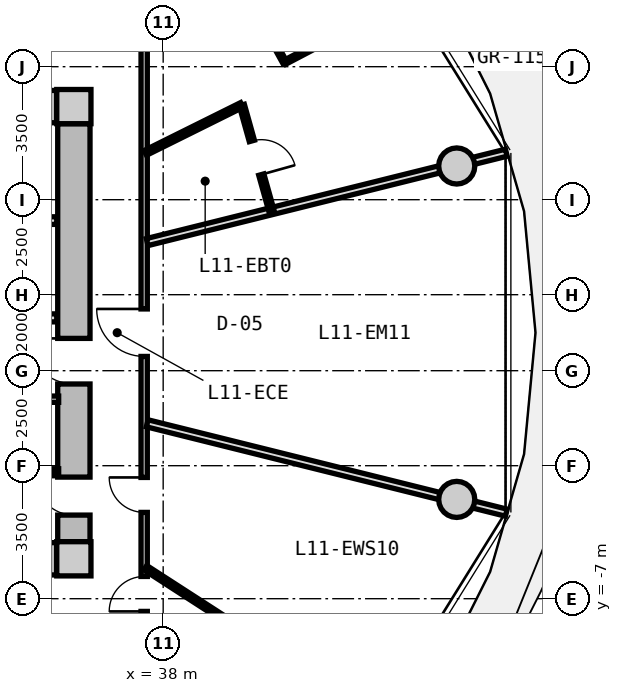
"""IFC4 building model, lengths in metres.
Left out: names, types, materials, properties, quantities, classifications, styles, units other than length and angle.
Written with IfcOpenShell. Run it as: python <this file> out.ifc"""

import sys

from ifc_helpers import new_model, si_unit, direction, frame, frame_2d, origin, origin_2d, place, context, subcontext, project, spatial, rectangle, circle, extrude, source, transform, mapped, element, fill, save


model = new_model("IFC4")
c1 = context("Model", 3, precision=1e-05, world=origin(), true_north=direction((0.0, 1.0)))
c2 = subcontext(c1, "Body", "Model", "MODEL_VIEW")
j1 = project(units=[si_unit("LENGTHUNIT", "METRE"), si_unit("PLANEANGLEUNIT", "RADIAN")], contexts=[c1])
p1 = place(None, origin())
s1 = spatial("IfcSite", under=j1, at=p1, CompositionType="ELEMENT")
p2 = place(p1, origin())
s2 = spatial("IfcBuilding", under=s1, at=p2, CompositionType="ELEMENT")
p3 = place(p2, frame((0.0, 0.0, 39.9)))
s3 = spatial("IfcBuildingStorey", under=s2, at=p3, CompositionType="ELEMENT", Elevation=39.9)
m1 = source(origin(), c2, "Body", "SweptSolid", [
    extrude(rectangle(XDim=0.9, YDim=0.9, at=origin_2d()), origin(), (0.0, 0.0, 1.0), 3.05),
])
for number, where, z_axis, x_axis in (
    (1, (35.65, -5.95, 0.0), (0.0, 0.0, 1.0), (1.0, 0.0, 0.0)),
    (2, (35.65, 5.95, 0.0), (0.0, 0.0, 1.0), (1.0, 0.0, 0.0)),
):
    element("IfcColumn", number, at=place(p3, frame(where, z_axis=z_axis, x_axis=x_axis)), inside=s3, PredefinedType="COLUMN", context=c2, shape_type="MappedRepresentation", body=[
        mapped(m1, transform((0.0, 0.0, 0.0), x_axis=(1.0, 0.0, 0.0), y_axis=(0.0, 1.0, 0.0), z_axis=(0.0, 0.0, 1.0), scale=1.0)),
    ])
m2 = source(origin(), c2, "Body", "SweptSolid", [
    extrude(rectangle(XDim=14.4, YDim=0.85, at=frame_2d((7.2, 0.0))), origin(), (0.0, 0.0, 1.0), 2.79),
])
for number, where, z_axis, x_axis in (
    (3, (20.8, 5.95, 0.0), (0.0, 0.0, 1.0), (1.0, 0.0, 0.0)),
    (4, (35.2, -5.95, 0.0), (0.0, 0.0, 1.0), (-1.0, 0.0, 0.0)),
):
    element("IfcWall", number, at=place(p3, frame(where, z_axis=z_axis, x_axis=x_axis)), inside=s3, PredefinedType="SHEAR", context=c2, shape_type="MappedRepresentation", body=[
        mapped(m2, transform((0.0, 0.0, 0.0), x_axis=(1.0, 0.0, 0.0), y_axis=(0.0, 1.0, 0.0), z_axis=(0.0, 0.0, 1.0), scale=1.0)),
    ])
m3 = source(origin(), c2, "Body", "SweptSolid", [
    extrude(rectangle(XDim=11.0, YDim=0.85, at=frame_2d((5.5, 0.0))), origin(), (0.0, 0.0, 1.0), 2.79),
])
p4 = place(p3, frame((35.65, 5.5, 0.0), z_axis=(0.0, 0.0, 1.0), x_axis=(0.0, -1.0, 0.0)))
e5 = element("IfcWall", 5, at=p4, inside=s3, PredefinedType="SHEAR", context=c2, shape_type="MappedRepresentation", body=[
    mapped(m3, transform((0.0, 0.0, 0.0), x_axis=(1.0, 0.0, 0.0), y_axis=(0.0, 1.0, 0.0), z_axis=(0.0, 0.0, 1.0), scale=1.0)),
])
p5 = place(p4, frame((5.65, 0.0, 0.0)))
e6 = element("IfcOpeningElement", 6, at=p5, cuts=e5, PredefinedType="OPENING", context=c2, shape_type="SweptSolid", body=[
    extrude(rectangle(XDim=1.2, YDim=2.15, at=frame_2d((0.6, 1.075))), frame((0.0, 0.435, 0.0), z_axis=(0.0, -1.0, 0.0), x_axis=(1.0, 0.0, 0.0)), (0.0, 0.0, 1.0), 0.87),
])
p6 = place(p4, frame((9.3, 0.0, 0.0)))
e7 = element("IfcOpeningElement", 7, at=p6, cuts=e5, PredefinedType="OPENING", context=c2, shape_type="SweptSolid", body=[
    extrude(rectangle(XDim=1.0, YDim=2.1, at=frame_2d((0.5, 1.05))), frame((0.0, 0.435, 0.0), z_axis=(0.0, -1.0, 0.0), x_axis=(1.0, 0.0, 0.0)), (0.0, 0.0, 1.0), 0.87),
])
m4 = source(origin(), c2, "Body", "SweptSolid", [
    extrude(circle(Radius=0.475, at=origin_2d()), origin(), (0.0, 0.0, 1.0), 3.05),
])
for number, where, z_axis, x_axis in (
    (8, (45.725, 4.387, 0.0), (0.0, 0.0, 1.0), (1.0, 0.0, 0.0)),
    (9, (45.725, -4.387, 0.0), (0.0, 0.0, 1.0), (1.0, 0.0, 0.0)),
):
    element("IfcColumn", number, at=place(p3, frame(where, z_axis=z_axis, x_axis=x_axis)), inside=s3, PredefinedType="COLUMN", context=c2, shape_type="MappedRepresentation", body=[
        mapped(m4, transform((0.0, 0.0, 0.0), x_axis=(1.0, 0.0, 0.0), y_axis=(0.0, 1.0, 0.0), z_axis=(0.0, 0.0, 1.0), scale=1.0)),
    ])
m5 = source(origin(), c2, "Body", "SweptSolid", [
    extrude(rectangle(XDim=3.2, YDim=0.2, at=frame_2d((1.6, 0.0))), origin(), (0.0, 0.0, 1.0), 2.775),
])
p7 = place(p3, frame((32.0, 2.95, 0.0), z_axis=(0.0, 0.0, 1.0), x_axis=(1.0, 0.0, 0.0)))
e10 = element("IfcWall", 10, at=p7, inside=s3, PredefinedType="PARTITIONING", context=c2, shape_type="MappedRepresentation", body=[
    mapped(m5, transform((0.0, 0.0, 0.0), x_axis=(1.0, 0.0, 0.0), y_axis=(0.0, 1.0, 0.0), z_axis=(0.0, 0.0, 1.0), scale=1.0)),
])
m6 = source(origin(), c2, "Body", "SweptSolid", [
    extrude(rectangle(XDim=6.66, YDim=0.21, at=frame_2d((3.33, 0.0))), origin(), (0.0, 0.0, 1.0), 2.775),
])
p8 = place(p3, frame((28.54, 0.39, 0.0), z_axis=(0.0, 0.0, 1.0), x_axis=(1.0, 0.0, 0.0)))
e11 = element("IfcWall", 11, at=p8, inside=s3, PredefinedType="PARTITIONING", context=c2, shape_type="MappedRepresentation", body=[
    mapped(m6, transform((0.0, 0.0, 0.0), x_axis=(1.0, 0.0, 0.0), y_axis=(0.0, 1.0, 0.0), z_axis=(0.0, 0.0, 1.0), scale=1.0)),
])
p9 = place(p8, frame((1.0, 0.0, 0.0)))
e12 = element("IfcOpeningElement", 12, at=p9, cuts=e11, PredefinedType="OPENING", context=c2, shape_type="SweptSolid", body=[
    extrude(rectangle(XDim=1.2, YDim=2.15, at=frame_2d((0.6, 1.075))), frame((0.0, 0.115, 0.0), z_axis=(0.0, -1.0, 0.0), x_axis=(1.0, 0.0, 0.0)), (0.0, 0.0, 1.0), 0.23),
])
m7 = source(origin(), c2, "Body", "SweptSolid", [
    extrude(rectangle(XDim=2.7, YDim=0.165, at=frame_2d((1.35, 0.0))), origin(), (0.0, 0.0, 1.0), 2.775),
])
p10 = place(p3, frame((32.55, -1.75, 0.0), z_axis=(0.0, 0.0, 1.0), x_axis=(1.0, 0.0, 0.0)))
e13 = element("IfcWall", 13, at=p10, inside=s3, PredefinedType="PARTITIONING", context=c2, shape_type="MappedRepresentation", body=[
    mapped(m7, transform((0.0, 0.0, 0.0), x_axis=(1.0, 0.0, 0.0), y_axis=(0.0, 1.0, 0.0), z_axis=(0.0, 0.0, 1.0), scale=1.0)),
])
p11 = place(p10, frame((0.85, 0.0, 0.0)))
e14 = element("IfcOpeningElement", 14, at=p11, cuts=e13, PredefinedType="OPENING", context=c2, shape_type="SweptSolid", body=[
    extrude(rectangle(XDim=0.925, YDim=2.1, at=frame_2d((0.462, 1.05))), frame((0.0, 0.093, 0.0), z_axis=(0.0, -1.0, 0.0), x_axis=(1.0, 0.0, 0.0)), (0.0, 0.0, 1.0), 0.185),
])
m8 = source(origin(), c2, "Body", "SweptSolid", [
    extrude(rectangle(XDim=2.7, YDim=0.14, at=frame_2d((1.35, 0.0))), origin(), (0.0, 0.0, 1.0), 2.775),
])
p12 = place(p3, frame((32.55, -3.65, 0.0), z_axis=(0.0, 0.0, 1.0), x_axis=(1.0, 0.0, 0.0)))
e15 = element("IfcWall", 15, at=p12, inside=s3, PredefinedType="PARTITIONING", context=c2, shape_type="MappedRepresentation", body=[
    mapped(m8, transform((0.0, 0.0, 0.0), x_axis=(1.0, 0.0, 0.0), y_axis=(0.0, 1.0, 0.0), z_axis=(0.0, 0.0, 1.0), scale=1.0)),
])
m9 = source(origin(), c2, "Body", "SweptSolid", [
    extrude(rectangle(XDim=15.6, YDim=0.165, at=frame_2d((7.8, 0.0))), origin(), (0.0, 0.0, 1.0), 2.775),
])
p13 = place(p3, frame((37.5, 7.8, 0.0), z_axis=(0.0, 0.0, 1.0), x_axis=(0.0, -1.0, 0.0)))
e16 = element("IfcWall", 16, at=p13, inside=s3, PredefinedType="PARTITIONING", context=c2, shape_type="MappedRepresentation", body=[
    mapped(m9, transform((0.0, 0.0, 0.0), x_axis=(1.0, 0.0, 0.0), y_axis=(0.0, 1.0, 0.0), z_axis=(0.0, 0.0, 1.0), scale=1.0)),
])
p14 = place(p13, frame((14.215, 0.0, 0.0)))
e17 = element("IfcOpeningElement", 17, at=p14, cuts=e16, PredefinedType="OPENING", context=c2, shape_type="SweptSolid", body=[
    extrude(rectangle(XDim=0.92, YDim=2.1, at=frame_2d((0.46, 1.05))), frame((0.0, 0.093, 0.0), z_axis=(0.0, -1.0, 0.0), x_axis=(1.0, 0.0, 0.0)), (0.0, 0.0, 1.0), 0.185),
])
p15 = place(p13, frame((11.609, 0.0, 0.0)))
e18 = element("IfcOpeningElement", 18, at=p15, cuts=e16, PredefinedType="OPENING", context=c2, shape_type="SweptSolid", body=[
    extrude(rectangle(XDim=0.92, YDim=2.1, at=frame_2d((0.46, 1.05))), frame((0.0, 0.093, 0.0), z_axis=(0.0, -1.0, 0.0), x_axis=(1.0, 0.0, 0.0)), (0.0, 0.0, 1.0), 0.185),
])
p16 = place(p13, frame((7.175, 0.0, 0.0)))
e19 = element("IfcOpeningElement", 19, at=p16, cuts=e16, PredefinedType="OPENING", context=c2, shape_type="SweptSolid", body=[
    extrude(rectangle(XDim=1.25, YDim=2.2, at=frame_2d((0.625, 1.1))), frame((0.0, 0.093, 0.0), z_axis=(0.0, -1.0, 0.0), x_axis=(1.0, 0.0, 0.0)), (0.0, 0.0, 1.0), 0.185),
])
m10 = source(origin(), c2, "Body", "SweptSolid", [
    extrude(rectangle(XDim=9.737, YDim=0.19, at=frame_2d((4.869, 0.0))), origin(), (0.0, 0.0, 1.0), 2.225),
])
p17 = place(p3, frame((37.58, -2.385, 0.0), z_axis=(0.0, 0.0, 1.0), x_axis=(0.970392716238, -0.241532557375, 0.0)))
e20 = element("IfcWall", 20, at=p17, inside=s3, PredefinedType="PARTITIONING", context=c2, shape_type="MappedRepresentation", body=[
    mapped(m10, transform((0.0, 0.0, 0.0), x_axis=(1.0, 0.0, 0.0), y_axis=(0.0, 1.0, 0.0), z_axis=(0.0, 0.0, 1.0), scale=1.0)),
])
m11 = source(origin(), c2, "Body", "SweptSolid", [
    extrude(rectangle(XDim=7.304, YDim=0.14, at=frame_2d((3.652, 0.0))), origin(), (0.0, 0.0, 1.0), 2.775),
])
p18 = place(p3, frame((37.53, -6.185, 0.0), z_axis=(0.0, 0.0, 1.0), x_axis=(0.83973870965, -0.54299069929, 0.0)))
e21 = element("IfcWall", 21, at=p18, inside=s3, PredefinedType="PARTITIONING", context=c2, shape_type="MappedRepresentation", body=[
    mapped(m11, transform((0.0, 0.0, 0.0), x_axis=(1.0, 0.0, 0.0), y_axis=(0.0, 1.0, 0.0), z_axis=(0.0, 0.0, 1.0), scale=1.0)),
])
p19 = place(p3, frame((37.58, 2.385, 0.0), z_axis=(0.0, 0.0, 1.0), x_axis=(0.970392716238, 0.241532557375, 0.0)))
e22 = element("IfcWall", 22, at=p19, inside=s3, PredefinedType="PARTITIONING", context=c2, shape_type="MappedRepresentation", body=[
    mapped(m10, transform((0.0, 0.0, 0.0), x_axis=(1.0, 0.0, 0.0), y_axis=(0.0, 1.0, 0.0), z_axis=(0.0, 0.0, 1.0), scale=1.0)),
])
m12 = source(origin(), c2, "Body", "SweptSolid", [
    extrude(rectangle(XDim=2.834, YDim=0.14, at=frame_2d((1.417, 0.0))), origin(), (0.0, 0.0, 1.0), 2.775),
])
p20 = place(p3, frame((37.53, 4.732, 0.0), z_axis=(0.0, 0.0, 1.0), x_axis=(0.895681174462, 0.444696788513, 0.0)))
e23 = element("IfcWall", 23, at=p20, inside=s3, PredefinedType="PARTITIONING", context=c2, shape_type="MappedRepresentation", body=[
    mapped(m12, transform((0.0, 0.0, 0.0), x_axis=(1.0, 0.0, 0.0), y_axis=(0.0, 1.0, 0.0), z_axis=(0.0, 0.0, 1.0), scale=1.0)),
])
m13 = source(origin(), c2, "Body", "SweptSolid", [
    extrude(rectangle(XDim=2.885, YDim=0.14, at=frame_2d((1.442, 0.0))), origin(), (0.0, 0.0, 1.0), 2.775),
])
p21 = place(p3, frame((40.069, 5.992, 0.0), z_axis=(0.0, 0.0, 1.0), x_axis=(0.269799431837, -0.962916541856, 0.0)))
e24 = element("IfcWall", 24, at=p21, inside=s3, PredefinedType="PARTITIONING", context=c2, shape_type="MappedRepresentation", body=[
    mapped(m13, transform((0.0, 0.0, 0.0), x_axis=(1.0, 0.0, 0.0), y_axis=(0.0, 1.0, 0.0), z_axis=(0.0, 0.0, 1.0), scale=1.0)),
])
p22 = place(p21, frame((0.982, 0.0, 0.0)))
e25 = element("IfcOpeningElement", 25, at=p22, cuts=e24, PredefinedType="OPENING", context=c2, shape_type="SweptSolid", body=[
    extrude(rectangle(XDim=0.92, YDim=2.1, at=frame_2d((0.46, 1.05))), frame((0.0, 0.08, 0.0), z_axis=(0.0, -1.0, 0.0), x_axis=(1.0, 0.0, 0.0)), (0.0, 0.0, 1.0), 0.16),
])
m14 = source(origin(), c2, "Body", "SweptSolid", [
    extrude(rectangle(XDim=3.706, YDim=0.115, at=frame_2d((1.853, 0.0))), origin(), (0.0, 0.0, 1.0), 2.775),
])
p23 = place(p3, frame((41.198, 7.115, 0.0), z_axis=(0.0, 0.0, 1.0), x_axis=(0.88538502503, 0.464858427322, 0.0)))
e26 = element("IfcWall", 26, at=p23, inside=s3, PredefinedType="PARTITIONING", context=c2, shape_type="MappedRepresentation", body=[
    mapped(m14, transform((0.0, 0.0, 0.0), x_axis=(1.0, 0.0, 0.0), y_axis=(0.0, 1.0, 0.0), z_axis=(0.0, 0.0, 1.0), scale=1.0)),
])
m15 = source(origin(), c2, "Body", "SweptSolid", [
    extrude(rectangle(XDim=3.926, YDim=0.115, at=frame_2d((1.963, 0.0))), origin(), (0.0, 0.0, 1.0), 2.775),
])
p24 = place(p3, frame((41.198, 7.115, 0.0), z_axis=(0.0, 0.0, 1.0), x_axis=(-0.483037889915, 0.875599450038, 0.0)))
e27 = element("IfcWall", 27, at=p24, inside=s3, PredefinedType="PARTITIONING", context=c2, shape_type="MappedRepresentation", body=[
    mapped(m15, transform((0.0, 0.0, 0.0), x_axis=(1.0, 0.0, 0.0), y_axis=(0.0, 1.0, 0.0), z_axis=(0.0, 0.0, 1.0), scale=1.0)),
])
p25 = place(p24, frame((1.488, 0.0, 0.0)))
e28 = element("IfcOpeningElement", 28, at=p25, cuts=e27, PredefinedType="OPENING", context=c2, shape_type="SweptSolid", body=[
    extrude(rectangle(XDim=0.95, YDim=2.1, at=frame_2d((0.475, 1.05))), frame((0.0, 0.067, 0.0), z_axis=(0.0, -1.0, 0.0), x_axis=(1.0, 0.0, 0.0)), (0.0, 0.0, 1.0), 0.135),
])
m16 = source(origin(), c2, "Body", "SweptSolid", [
    extrude(rectangle(XDim=1.2, YDim=2.15, at=frame_2d((0.6, 1.075))), frame((0.0, 0.025, 0.0), z_axis=(0.0, -1.0, 0.0), x_axis=(1.0, 0.0, 0.0)), (0.0, 0.0, 1.0), 0.05),
])
p26 = place(p5, frame((1.2, 0.0, 0.0), z_axis=(0.0, 0.0, 1.0), x_axis=(-1.0, 0.0, 0.0)))
e29 = element("IfcDoor", 29, at=p26, inside=s3, OperationType="SINGLE_SWING_RIGHT", PredefinedType="DOOR", context=c2, shape_type="MappedRepresentation", body=[
    mapped(m16, transform((0.0, 0.0, 0.0), x_axis=(1.0, 0.0, 0.0), y_axis=(0.0, 1.0, 0.0), z_axis=(0.0, 0.0, 1.0), scale=1.0)),
])
fill(e6, e29)
m17 = source(origin(), c2, "Body", "SweptSolid", [
    extrude(rectangle(XDim=1.0, YDim=2.1, at=frame_2d((0.5, 1.05))), frame((0.0, 0.025, 0.0), z_axis=(0.0, -1.0, 0.0), x_axis=(1.0, 0.0, 0.0)), (0.0, 0.0, 1.0), 0.05),
])
p27 = place(p6, frame((1.0, 0.0, 0.0), z_axis=(0.0, 0.0, 1.0), x_axis=(-1.0, 0.0, 0.0)))
e30 = element("IfcDoor", 30, at=p27, inside=s3, OperationType="SINGLE_SWING_RIGHT", PredefinedType="DOOR", context=c2, shape_type="MappedRepresentation", body=[
    mapped(m17, transform((0.0, 0.0, 0.0), x_axis=(1.0, 0.0, 0.0), y_axis=(0.0, 1.0, 0.0), z_axis=(0.0, 0.0, 1.0), scale=1.0)),
])
fill(e7, e30)
m18 = source(origin(), c2, "Body", "SweptSolid", [
    extrude(rectangle(XDim=0.92, YDim=2.1, at=frame_2d((0.46, 1.05))), frame((0.0, 0.025, 0.0), z_axis=(0.0, -1.0, 0.0), x_axis=(1.0, 0.0, 0.0)), (0.0, 0.0, 1.0), 0.05),
])
p28 = place(p14, frame((0.92, 0.0, 0.0), z_axis=(0.0, 0.0, 1.0), x_axis=(-1.0, 0.0, 0.0)))
e31 = element("IfcDoor", 31, at=p28, inside=s3, OperationType="SINGLE_SWING_LEFT", PredefinedType="DOOR", context=c2, shape_type="MappedRepresentation", body=[
    mapped(m18, transform((0.0, 0.0, 0.0), x_axis=(1.0, 0.0, 0.0), y_axis=(0.0, 1.0, 0.0), z_axis=(0.0, 0.0, 1.0), scale=1.0)),
])
fill(e17, e31)
p29 = place(p15, frame((0.92, 0.0, 0.0), z_axis=(0.0, 0.0, 1.0), x_axis=(-1.0, 0.0, 0.0)))
e32 = element("IfcDoor", 32, at=p29, inside=s3, OperationType="SINGLE_SWING_RIGHT", PredefinedType="DOOR", context=c2, shape_type="MappedRepresentation", body=[
    mapped(m18, transform((0.0, 0.0, 0.0), x_axis=(1.0, 0.0, 0.0), y_axis=(0.0, 1.0, 0.0), z_axis=(0.0, 0.0, 1.0), scale=1.0)),
])
fill(e18, e32)
m19 = source(origin(), c2, "Body", "SweptSolid", [
    extrude(rectangle(XDim=1.25, YDim=2.2, at=frame_2d((0.625, 1.1))), frame((0.0, 0.025, 0.0), z_axis=(0.0, -1.0, 0.0), x_axis=(1.0, 0.0, 0.0)), (0.0, 0.0, 1.0), 0.05),
])
p30 = place(p16, frame((1.25, 0.0, 0.0), z_axis=(0.0, 0.0, 1.0), x_axis=(-1.0, 0.0, 0.0)))
e33 = element("IfcDoor", 33, at=p30, inside=s3, OperationType="SINGLE_SWING_RIGHT", PredefinedType="DOOR", context=c2, shape_type="MappedRepresentation", body=[
    mapped(m19, transform((0.0, 0.0, 0.0), x_axis=(1.0, 0.0, 0.0), y_axis=(0.0, 1.0, 0.0), z_axis=(0.0, 0.0, 1.0), scale=1.0)),
])
fill(e19, e33)
p31 = place(p22, origin())
e34 = element("IfcDoor", 34, at=p31, inside=s3, OperationType="SINGLE_SWING_RIGHT", PredefinedType="DOOR", context=c2, shape_type="MappedRepresentation", body=[
    mapped(m18, transform((0.0, 0.0, 0.0), x_axis=(1.0, 0.0, 0.0), y_axis=(0.0, 1.0, 0.0), z_axis=(0.0, 0.0, 1.0), scale=1.0)),
])
fill(e25, e34)
save(model, sys.argv[1])
